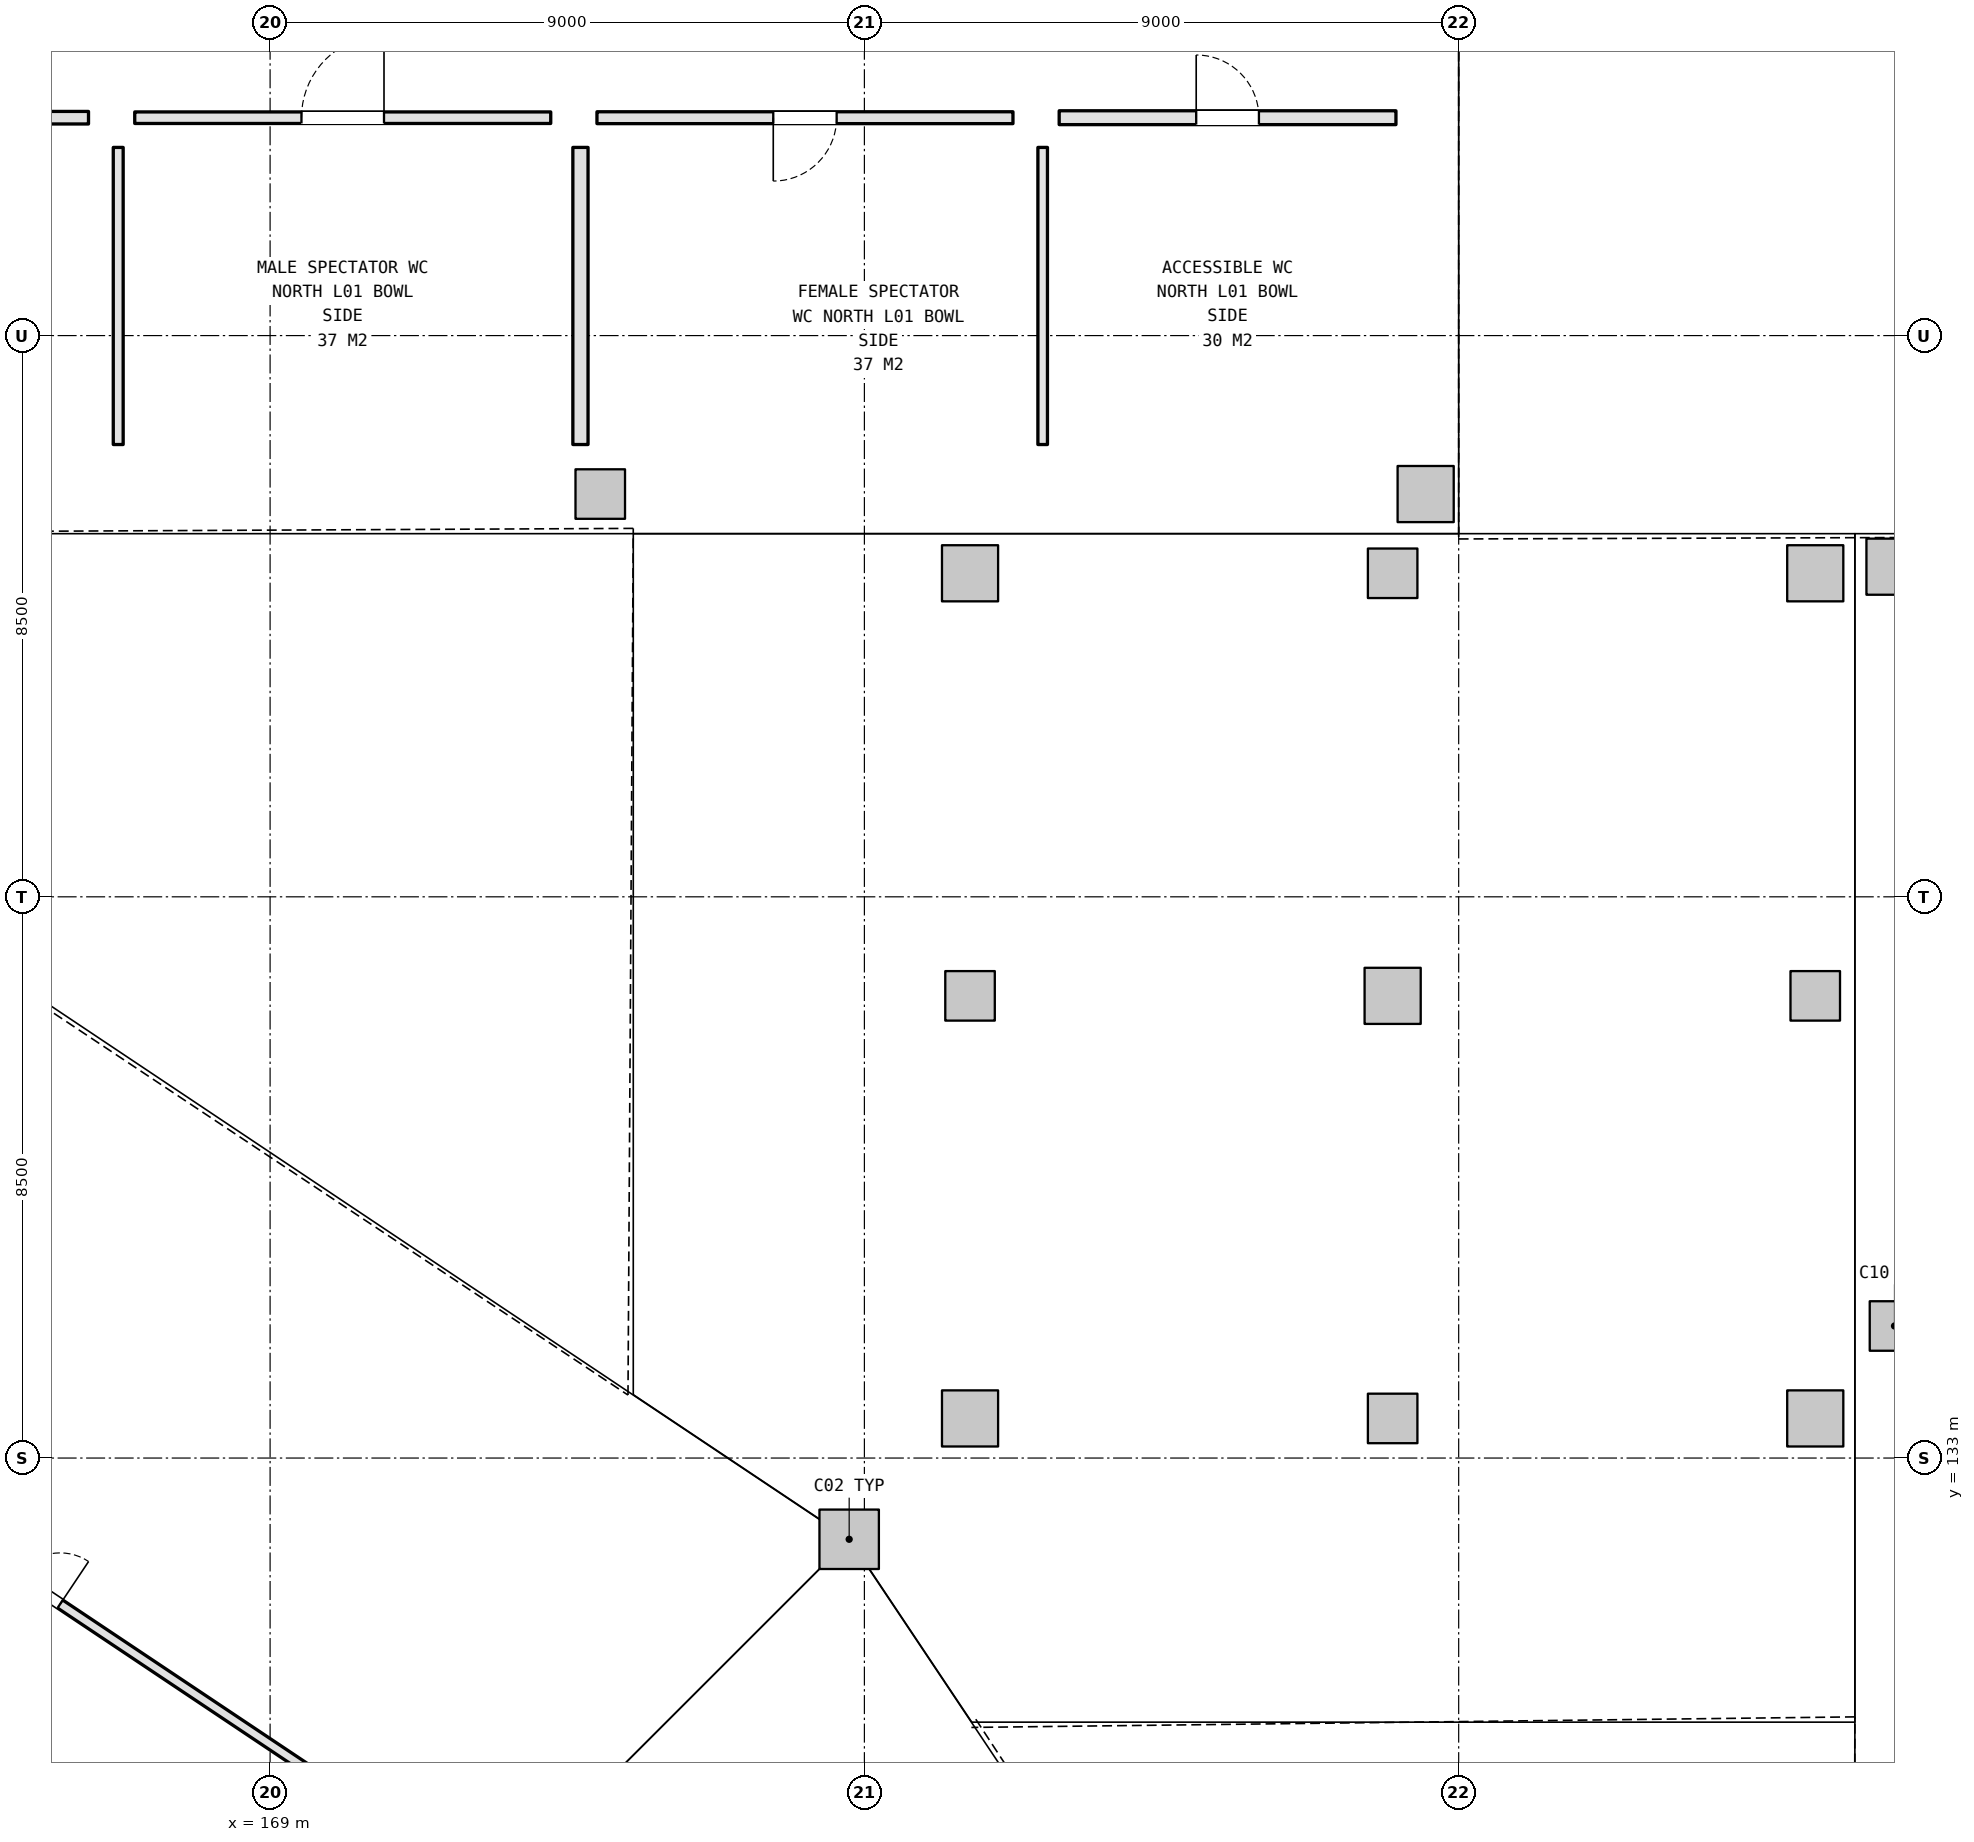
"""IFC4 building model, lengths in metres.
Left out: names, types, materials, properties, quantities, classifications, styles, units other than length and angle.
Written with IfcOpenShell. Run it as: python <this file> out.ifc"""

import sys

from ifc_helpers import new_model, si_unit, direction, frame, frame_2d, origin, origin_2d, place, context, subcontext, project, spatial, rectangle, extrude, element, fill, save


model = new_model("IFC4")
c1 = context("Model", 3, precision=1e-05, world=origin(), true_north=direction((0.0, 1.0)))
c2 = subcontext(c1, "Body", "Model", "MODEL_VIEW")
j1 = project(units=[si_unit("LENGTHUNIT", "METRE"), si_unit("PLANEANGLEUNIT", "RADIAN")], contexts=[c1])
p1 = place(None, origin())
s1 = spatial("IfcSite", under=j1, at=p1, CompositionType="ELEMENT")
p2 = place(p1, origin())
s2 = spatial("IfcBuilding", under=s1, at=p2, CompositionType="ELEMENT")
p3 = place(p2, frame((0.0, 0.0, 5.4)))
s3 = spatial("IfcBuildingStorey", under=s2, at=p3, CompositionType="ELEMENT", Elevation=5.4)
p4 = place(p3, frame((177.77, 131.77, 0.0), z_axis=(0.0, 0.0, 1.0), x_axis=(1.0, 0.0, 0.0)))
e1 = element("IfcColumn", 1, at=p4, inside=s3, PredefinedType="COLUMN", context=c2, shape_type="SweptSolid", body=[
    extrude(rectangle(XDim=0.9, YDim=0.9, at=origin_2d()), origin(), (0.0, 0.0, 1.0), 5.4),
])
p5 = place(p3, frame((193.6, 135.0, 0.0), z_axis=(0.0, 0.0, 1.0), x_axis=(1.0, 0.0, 0.0)))
e2 = element("IfcColumn", 2, at=p5, inside=s3, PredefinedType="COLUMN", context=c2, shape_type="SweptSolid", body=[
    extrude(rectangle(XDim=0.75, YDim=0.75, at=origin_2d()), origin(), (0.0, 0.0, 1.0), 5.4),
])
p6 = place(p3, frame((193.6, 146.5, 0.0), z_axis=(0.0, 0.0, 1.0), x_axis=(1.0, 0.0, 0.0)))
e3 = element("IfcColumn", 3, at=p6, inside=s3, PredefinedType="COLUMN", context=c2, shape_type="SweptSolid", body=[
    extrude(rectangle(XDim=0.85, YDim=0.85, at=origin_2d()), origin(), (0.0, 0.0, 1.0), 5.4),
])
p7 = place(p3, frame((174.0, 147.6, 0.0), z_axis=(0.0, 0.0, 1.0), x_axis=(1.0, 0.0, 0.0)))
e4 = element("IfcColumn", 4, at=p7, inside=s3, PredefinedType="COLUMN", context=c2, shape_type="SweptSolid", body=[
    extrude(rectangle(XDim=0.75, YDim=0.75, at=origin_2d()), origin(), (0.0, 0.0, 1.0), 5.4),
])
for number, where, z_axis, x_axis in (
    (5, (186.5, 147.6, 0.0), (0.0, 0.0, 1.0), (1.0, 0.0, 0.0)),
    (6, (179.6, 133.6, 0.0), (0.0, 0.0, 1.0), (1.0, 0.0, 0.0)),
):
    element("IfcColumn", number, at=place(p3, frame(where, z_axis=z_axis, x_axis=x_axis)), inside=s3, PredefinedType="COLUMN", context=c2, shape_type="SweptSolid", body=[
        extrude(rectangle(XDim=0.85, YDim=0.85, at=origin_2d()), origin(), (0.0, 0.0, 1.0), 5.4),
    ])
p8 = place(p3, frame((179.6, 140.0, 0.0), z_axis=(0.0, 0.0, 1.0), x_axis=(1.0, 0.0, 0.0)))
e7 = element("IfcColumn", 7, at=p8, inside=s3, PredefinedType="COLUMN", context=c2, shape_type="SweptSolid", body=[
    extrude(rectangle(XDim=0.75, YDim=0.75, at=origin_2d()), origin(), (0.0, 0.0, 1.0), 5.4),
])
p9 = place(p3, frame((179.6, 146.4, 0.0), z_axis=(0.0, 0.0, 1.0), x_axis=(1.0, 0.0, 0.0)))
e8 = element("IfcColumn", 8, at=p9, inside=s3, PredefinedType="COLUMN", context=c2, shape_type="SweptSolid", body=[
    extrude(rectangle(XDim=0.85, YDim=0.85, at=origin_2d()), origin(), (0.0, 0.0, 1.0), 5.4),
])
p10 = place(p3, frame((186.0, 133.6, 0.0), z_axis=(0.0, 0.0, 1.0), x_axis=(1.0, 0.0, 0.0)))
e9 = element("IfcColumn", 9, at=p10, inside=s3, PredefinedType="COLUMN", context=c2, shape_type="SweptSolid", body=[
    extrude(rectangle(XDim=0.75, YDim=0.75, at=origin_2d()), origin(), (0.0, 0.0, 1.0), 5.4),
])
p11 = place(p3, frame((186.0, 140.0, 0.0), z_axis=(0.0, 0.0, 1.0), x_axis=(1.0, 0.0, 0.0)))
e10 = element("IfcColumn", 10, at=p11, inside=s3, PredefinedType="COLUMN", context=c2, shape_type="SweptSolid", body=[
    extrude(rectangle(XDim=0.85, YDim=0.85, at=origin_2d()), origin(), (0.0, 0.0, 1.0), 5.4),
])
p12 = place(p3, frame((186.0, 146.4, 0.0), z_axis=(0.0, 0.0, 1.0), x_axis=(1.0, 0.0, 0.0)))
e11 = element("IfcColumn", 11, at=p12, inside=s3, PredefinedType="COLUMN", context=c2, shape_type="SweptSolid", body=[
    extrude(rectangle(XDim=0.75, YDim=0.75, at=origin_2d()), origin(), (0.0, 0.0, 1.0), 5.4),
])
p13 = place(p3, frame((192.4, 133.6, 0.0), z_axis=(0.0, 0.0, 1.0), x_axis=(1.0, 0.0, 0.0)))
e12 = element("IfcColumn", 12, at=p13, inside=s3, PredefinedType="COLUMN", context=c2, shape_type="SweptSolid", body=[
    extrude(rectangle(XDim=0.85, YDim=0.85, at=origin_2d()), origin(), (0.0, 0.0, 1.0), 5.4),
])
p14 = place(p3, frame((192.4, 140.0, 0.0), z_axis=(0.0, 0.0, 1.0), x_axis=(1.0, 0.0, 0.0)))
e13 = element("IfcColumn", 13, at=p14, inside=s3, PredefinedType="COLUMN", context=c2, shape_type="SweptSolid", body=[
    extrude(rectangle(XDim=0.75, YDim=0.75, at=origin_2d()), origin(), (0.0, 0.0, 1.0), 5.4),
])
p15 = place(p3, frame((192.4, 146.4, 0.0), z_axis=(0.0, 0.0, 1.0), x_axis=(1.0, 0.0, 0.0)))
e14 = element("IfcColumn", 14, at=p15, inside=s3, PredefinedType="COLUMN", context=c2, shape_type="SweptSolid", body=[
    extrude(rectangle(XDim=0.85, YDim=0.85, at=origin_2d()), origin(), (0.0, 0.0, 1.0), 5.4),
])
p16 = place(p3, frame((146.95, 153.3, 0.0), z_axis=(0.0, 0.0, 1.0), x_axis=(1.0, 0.0, 0.0)))
e15 = element("IfcWall", 15, at=p16, inside=s3, PredefinedType="PARTITIONING", context=c2, shape_type="SweptSolid", body=[
    extrude(rectangle(XDim=19.3, YDim=0.19, at=frame_2d((9.65, 0.0))), origin(), (0.0, 0.0, 1.0), 4.525),
])
p17 = place(p16, frame((9.2, 0.0, 0.0)))
e16 = element("IfcOpeningElement", 16, at=p17, cuts=e15, PredefinedType="OPENING", context=c2, shape_type="SweptSolid", body=[
    extrude(rectangle(XDim=0.9, YDim=2.1, at=frame_2d((0.45, 1.05))), frame((0.0, 0.105, 0.0), z_axis=(0.0, -1.0, 0.0), x_axis=(1.0, 0.0, 0.0)), (0.0, 0.0, 1.0), 0.21),
])
p18 = place(p3, frame((166.95, 153.3, 0.0), z_axis=(0.0, 0.0, 1.0), x_axis=(1.0, 0.0, 0.0)))
e17 = element("IfcWall", 17, at=p18, inside=s3, PredefinedType="PARTITIONING", context=c2, shape_type="SweptSolid", body=[
    extrude(rectangle(XDim=6.3, YDim=0.175, at=frame_2d((3.15, 0.0))), origin(), (0.0, 0.0, 1.0), 5.12),
])
p19 = place(p18, frame((2.525, 0.0, 0.0)))
e18 = element("IfcOpeningElement", 18, at=p19, cuts=e17, PredefinedType="OPENING", context=c2, shape_type="SweptSolid", body=[
    extrude(rectangle(XDim=1.25, YDim=2.2, at=frame_2d((0.625, 1.1))), frame((0.0, 0.097, 0.0), z_axis=(0.0, -1.0, 0.0), x_axis=(1.0, 0.0, 0.0)), (0.0, 0.0, 1.0), 0.195),
])
p20 = place(p3, frame((166.7, 148.35, 0.0), z_axis=(0.0, 0.0, 1.0), x_axis=(0.0, 1.0, 0.0)))
e19 = element("IfcWall", 19, at=p20, inside=s3, PredefinedType="PARTITIONING", context=c2, shape_type="SweptSolid", body=[
    extrude(rectangle(XDim=4.5, YDim=0.15, at=frame_2d((2.25, 0.0))), origin(), (0.0, 0.0, 1.0), 4.675),
])
p21 = place(p3, frame((173.95, 153.3, 0.0), z_axis=(0.0, 0.0, 1.0), x_axis=(1.0, 0.0, 0.0)))
e20 = element("IfcWall", 20, at=p21, inside=s3, PredefinedType="PARTITIONING", context=c2, shape_type="SweptSolid", body=[
    extrude(rectangle(XDim=6.3, YDim=0.18, at=frame_2d((3.15, 0.0))), origin(), (0.0, 0.0, 1.0), 4.525),
])
p22 = place(p21, frame((2.67, 0.0, 0.0)))
e21 = element("IfcOpeningElement", 21, at=p22, cuts=e20, PredefinedType="OPENING", context=c2, shape_type="SweptSolid", body=[
    extrude(rectangle(XDim=0.96, YDim=2.15, at=frame_2d((0.48, 1.075))), frame((0.0, 0.1, 0.0), z_axis=(0.0, -1.0, 0.0), x_axis=(1.0, 0.0, 0.0)), (0.0, 0.0, 1.0), 0.2),
])
p23 = place(p3, frame((173.7, 148.35, 0.0), z_axis=(0.0, 0.0, 1.0), x_axis=(0.0, 1.0, 0.0)))
e22 = element("IfcWall", 22, at=p23, inside=s3, PredefinedType="PLUMBINGWALL", context=c2, shape_type="SweptSolid", body=[
    extrude(rectangle(XDim=4.5, YDim=0.23, at=frame_2d((2.25, 0.0))), origin(), (0.0, 0.0, 1.0), 4.525),
])
p24 = place(p3, frame((180.95, 153.3, 0.0), z_axis=(0.0, 0.0, 1.0), x_axis=(1.0, 0.0, 0.0)))
e23 = element("IfcWall", 23, at=p24, inside=s3, PredefinedType="PLUMBINGWALL", context=c2, shape_type="SweptSolid", body=[
    extrude(rectangle(XDim=5.1, YDim=0.21, at=frame_2d((2.55, 0.0))), origin(), (0.0, 0.0, 1.0), 5.12),
])
p25 = place(p24, frame((2.075, 0.0, 0.0)))
e24 = element("IfcOpeningElement", 24, at=p25, cuts=e23, PredefinedType="OPENING", context=c2, shape_type="SweptSolid", body=[
    extrude(rectangle(XDim=0.95, YDim=2.15, at=frame_2d((0.475, 1.075))), frame((0.0, 0.115, 0.0), z_axis=(0.0, -1.0, 0.0), x_axis=(1.0, 0.0, 0.0)), (0.0, 0.0, 1.0), 0.23),
])
p26 = place(p3, frame((180.7, 148.35, 0.0), z_axis=(0.0, 0.0, 1.0), x_axis=(0.0, 1.0, 0.0)))
e25 = element("IfcWall", 25, at=p26, inside=s3, PredefinedType="PARTITIONING", context=c2, shape_type="SweptSolid", body=[
    extrude(rectangle(XDim=4.5, YDim=0.145, at=frame_2d((2.25, 0.0))), origin(), (0.0, 0.0, 1.0), 4.675),
])
p27 = place(p3, frame((158.199, 135.881, 0.0), z_axis=(0.0, 0.0, 1.0), x_axis=(0.831472453136, -0.555565981388, 0.0)))
e26 = element("IfcWall", 26, at=p27, inside=s3, PredefinedType="PARTITIONING", context=c2, shape_type="SweptSolid", body=[
    extrude(rectangle(XDim=16.783, YDim=0.145, at=frame_2d((8.392, 0.0))), origin(), (0.0, 0.0, 1.0), 4.305),
])
p28 = place(p27, frame((7.617, 0.0, 0.0)))
e27 = element("IfcOpeningElement", 27, at=p28, cuts=e26, PredefinedType="OPENING", context=c2, shape_type="SweptSolid", body=[
    extrude(rectangle(XDim=1.55, YDim=2.15, at=frame_2d((0.775, 1.075))), frame((0.0, 0.083, 0.0), z_axis=(0.0, -1.0, 0.0), x_axis=(1.0, 0.0, 0.0)), (0.0, 0.0, 1.0), 0.165),
])
p29 = place(p19, origin())
e28 = element("IfcDoor", 28, at=p29, inside=s3, OperationType="SINGLE_SWING_RIGHT", PredefinedType="DOOR", context=c2, shape_type="SweptSolid", body=[
    extrude(rectangle(XDim=1.25, YDim=2.2, at=frame_2d((0.625, 1.1))), frame((0.0, 0.025, 0.0), z_axis=(0.0, -1.0, 0.0), x_axis=(1.0, 0.0, 0.0)), (0.0, 0.0, 1.0), 0.05),
])
fill(e18, e28)
p30 = place(p22, frame((0.96, 0.0, 0.0), z_axis=(0.0, 0.0, 1.0), x_axis=(-1.0, 0.0, 0.0)))
e29 = element("IfcDoor", 29, at=p30, inside=s3, OperationType="SINGLE_SWING_LEFT", PredefinedType="DOOR", context=c2, shape_type="SweptSolid", body=[
    extrude(rectangle(XDim=0.96, YDim=2.15, at=frame_2d((0.48, 1.075))), frame((0.0, 0.025, 0.0), z_axis=(0.0, -1.0, 0.0), x_axis=(1.0, 0.0, 0.0)), (0.0, 0.0, 1.0), 0.05),
])
fill(e21, e29)
p31 = place(p25, origin())
e30 = element("IfcDoor", 30, at=p31, inside=s3, OperationType="SINGLE_SWING_LEFT", PredefinedType="DOOR", context=c2, shape_type="SweptSolid", body=[
    extrude(rectangle(XDim=0.95, YDim=2.15, at=frame_2d((0.475, 1.075))), frame((0.0, 0.025, 0.0), z_axis=(0.0, -1.0, 0.0), x_axis=(1.0, 0.0, 0.0)), (0.0, 0.0, 1.0), 0.05),
])
fill(e24, e30)
p32 = place(p28, origin())
e31 = element("IfcDoor", 31, at=p32, inside=s3, OperationType="DOUBLE_DOOR_SINGLE_SWING", PredefinedType="DOOR", context=c2, shape_type="SweptSolid", body=[
    extrude(rectangle(XDim=1.55, YDim=2.15, at=frame_2d((0.775, 1.075))), frame((0.0, 0.025, 0.0), z_axis=(0.0, -1.0, 0.0), x_axis=(1.0, 0.0, 0.0)), (0.0, 0.0, 1.0), 0.05),
])
fill(e27, e31)
save(model, sys.argv[1])
